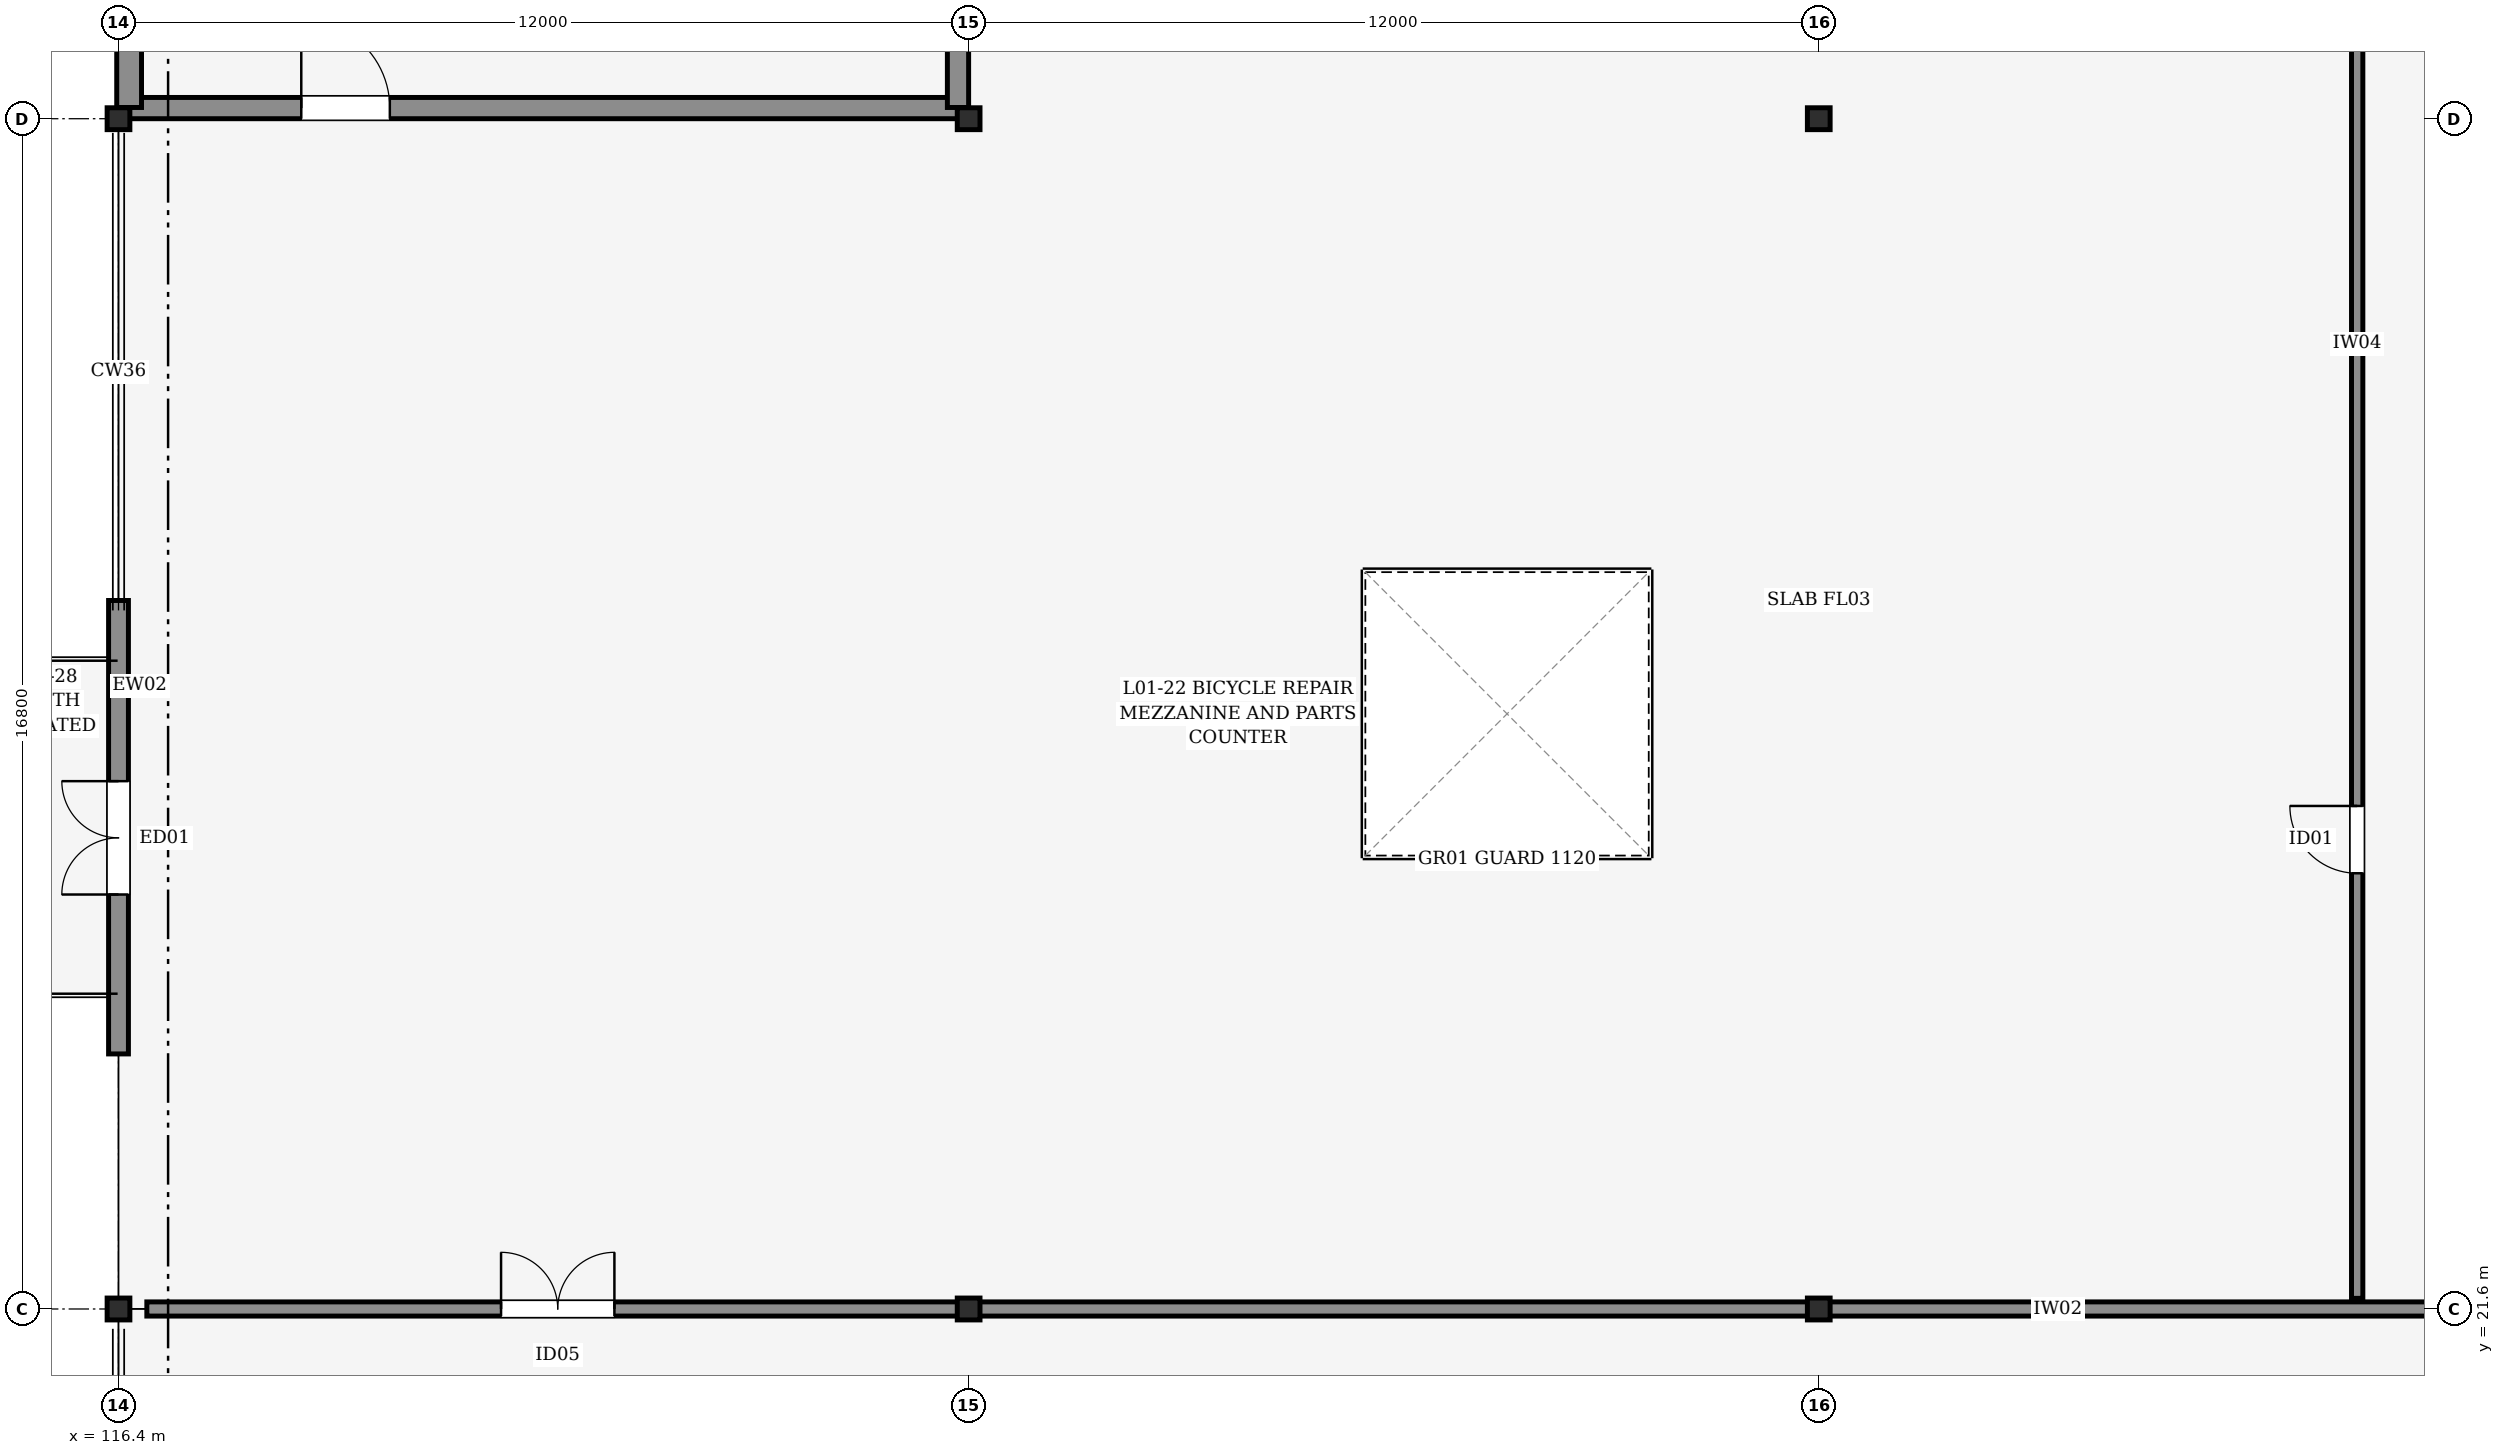
"""IFC4 building model, lengths in metres.
Left out: names, types, materials, properties, quantities, classifications, styles, units other than length and angle.
Written with IfcOpenShell. Run it as: python <this file> out.ifc"""

import sys

from ifc_helpers import new_model, si_unit, direction, frame, frame_2d, origin, origin_2d, place, context, subcontext, project, spatial, rectangle, i_section, extrude, element, fill, save


model = new_model("IFC4")
c1 = context("Model", 3, precision=1e-05, world=origin(), true_north=direction((0.0, 1.0)))
c2 = subcontext(c1, "Body", "Model", "MODEL_VIEW")
j1 = project(units=[si_unit("LENGTHUNIT", "METRE"), si_unit("PLANEANGLEUNIT", "RADIAN")], contexts=[c1])
p1 = place(None, origin())
s1 = spatial("IfcSite", under=j1, at=p1, CompositionType="ELEMENT")
p2 = place(p1, origin())
s2 = spatial("IfcBuilding", under=s1, at=p2, CompositionType="ELEMENT")
p3 = place(p2, frame((0.0, 0.0, 5.4)))
s3 = spatial("IfcBuildingStorey", under=s2, at=p3, CompositionType="ELEMENT", Elevation=5.4)
for number, where, z_axis, x_axis in (
    (1, (116.4, 21.6, 0.0), (0.0, 0.0, 1.0), (1.0, 0.0, 0.0)),
    (2, (116.4, 38.4, 0.0), (0.0, 0.0, 1.0), (1.0, 0.0, 0.0)),
    (3, (128.4, 21.6, 0.0), (0.0, 0.0, 1.0), (1.0, 0.0, 0.0)),
    (4, (128.4, 38.4, 0.0), (0.0, 0.0, 1.0), (1.0, 0.0, 0.0)),
    (5, (140.4, 21.6, 0.0), (0.0, 0.0, 1.0), (1.0, 0.0, 0.0)),
    (6, (140.4, 38.4, 0.0), (0.0, 0.0, 1.0), (1.0, 0.0, 0.0)),
):
    element("IfcColumn", number, at=place(p3, frame(where, z_axis=z_axis, x_axis=x_axis)), inside=s3, PredefinedType="COLUMN", context=c2, shape_type="SweptSolid", body=[
        extrude(i_section(OverallWidth=0.309, OverallDepth=0.321, WebThickness=0.014, FlangeThickness=0.022, FilletRadius=0.015, at=origin_2d()), origin(), (0.0, 0.0, 1.0), 3.6),
    ])
p4 = place(p3, frame((116.4, 25.2, 0.0), z_axis=(0.0, 0.0, 1.0), x_axis=(0.0, 1.0, 0.0)))
e7 = element("IfcWall", 7, at=p4, inside=s3, PredefinedType="STANDARD", context=c2, shape_type="SweptSolid", body=[
    extrude(rectangle(XDim=6.4, YDim=0.28, at=frame_2d((3.2, 0.0))), origin(), (0.0, 0.0, 1.0), 2.535),
])
p5 = place(p4, frame((2.25, 0.0, 0.0)))
e8 = element("IfcOpeningElement", 8, at=p5, cuts=e7, PredefinedType="OPENING", context=c2, shape_type="SweptSolid", body=[
    extrude(rectangle(XDim=1.6, YDim=2.2, at=frame_2d((0.8, 1.1))), frame((0.0, 0.15, 0.0), z_axis=(0.0, -1.0, 0.0), x_axis=(1.0, 0.0, 0.0)), (0.0, 0.0, 1.0), 0.3),
])
p6 = place(p3, frame((116.552, 38.55, 0.0), z_axis=(0.0, 0.0, 1.0), x_axis=(1.0, 0.0, 0.0)))
e9 = element("IfcWall", 9, at=p6, inside=s3, PredefinedType="SHEAR", context=c2, shape_type="SweptSolid", body=[
    extrude(rectangle(XDim=11.695, YDim=0.3, at=frame_2d((5.848, 0.0))), origin(), (0.0, 0.0, 1.0), 3.38),
])
p7 = place(p6, frame((2.427, 0.0, 0.0)))
e10 = element("IfcOpeningElement", 10, at=p7, cuts=e9, PredefinedType="OPENING", context=c2, shape_type="SweptSolid", body=[
    extrude(rectangle(XDim=1.25, YDim=2.15, at=frame_2d((0.625, 1.075))), frame((0.0, 0.16, 0.0), z_axis=(0.0, -1.0, 0.0), x_axis=(1.0, 0.0, 0.0)), (0.0, 0.0, 1.0), 0.32),
])
p8 = place(p3, frame((116.55, 38.559, 0.0), z_axis=(0.0, 0.0, 1.0), x_axis=(0.0, 1.0, 0.0)))
e11 = element("IfcWall", 11, at=p8, inside=s3, PredefinedType="SHEAR", context=c2, shape_type="SweptSolid", body=[
    extrude(rectangle(XDim=8.083, YDim=0.35, at=frame_2d((4.042, 0.0))), origin(), (0.0, 0.0, 1.0), 3.38),
])
p9 = place(p3, frame((128.25, 38.559, 0.0), z_axis=(0.0, 0.0, 1.0), x_axis=(0.0, 1.0, 0.0)))
e12 = element("IfcWall", 12, at=p9, inside=s3, PredefinedType="SHEAR", context=c2, shape_type="SweptSolid", body=[
    extrude(rectangle(XDim=8.083, YDim=0.3, at=frame_2d((4.042, 0.0))), origin(), (0.0, 0.0, 1.0), 3.38),
])
p10 = place(p3, frame((116.8, 21.6, 0.0), z_axis=(0.0, 0.0, 1.0), x_axis=(1.0, 0.0, 0.0)))
e13 = element("IfcWall", 13, at=p10, inside=s3, PredefinedType="PARTITIONING", context=c2, shape_type="SweptSolid", body=[
    extrude(rectangle(XDim=47.2, YDim=0.2, at=frame_2d((23.6, 0.0))), origin(), (0.0, 0.0, 1.0), 2.525),
])
p11 = place(p10, frame((5.0, 0.0, 0.0)))
e14 = element("IfcOpeningElement", 14, at=p11, cuts=e13, PredefinedType="OPENING", context=c2, shape_type="SweptSolid", body=[
    extrude(rectangle(XDim=1.6, YDim=2.25, at=frame_2d((0.8, 1.125))), frame((0.0, 0.11, 0.0), z_axis=(0.0, -1.0, 0.0), x_axis=(1.0, 0.0, 0.0)), (0.0, 0.0, 1.0), 0.22),
])
p12 = place(p3, frame((148.0, 21.75, 0.0), z_axis=(0.0, 0.0, 1.0), x_axis=(0.0, 1.0, 0.0)))
e15 = element("IfcWall", 15, at=p12, inside=s3, PredefinedType="PARTITIONING", context=c2, shape_type="SweptSolid", body=[
    extrude(rectangle(XDim=24.9, YDim=0.16, at=frame_2d((12.45, 0.0))), origin(), (0.0, 0.0, 1.0), 2.525),
])
p13 = place(p12, frame((6.0, 0.0, 0.0)))
e16 = element("IfcOpeningElement", 16, at=p13, cuts=e15, PredefinedType="OPENING", context=c2, shape_type="SweptSolid", body=[
    extrude(rectangle(XDim=0.95, YDim=2.1, at=frame_2d((0.475, 1.05))), frame((0.0, 0.09, 0.0), z_axis=(0.0, -1.0, 0.0), x_axis=(1.0, 0.0, 0.0)), (0.0, 0.0, 1.0), 0.18),
])
p14 = place(p5, origin())
e17 = element("IfcDoor", 17, at=p14, inside=s3, OperationType="DOUBLE_DOOR_SINGLE_SWING", PredefinedType="DOOR", context=c2, shape_type="SweptSolid", body=[
    extrude(rectangle(XDim=1.6, YDim=2.2, at=frame_2d((0.8, 1.1))), frame((0.0, 0.025, 0.0), z_axis=(0.0, -1.0, 0.0), x_axis=(1.0, 0.0, 0.0)), (0.0, 0.0, 1.0), 0.05),
])
fill(e8, e17)
p15 = place(p7, origin())
e18 = element("IfcDoor", 18, at=p15, inside=s3, OperationType="SINGLE_SWING_LEFT", PredefinedType="DOOR", context=c2, shape_type="SweptSolid", body=[
    extrude(rectangle(XDim=1.25, YDim=2.15, at=frame_2d((0.625, 1.075))), frame((0.0, 0.025, 0.0), z_axis=(0.0, -1.0, 0.0), x_axis=(1.0, 0.0, 0.0)), (0.0, 0.0, 1.0), 0.05),
])
fill(e10, e18)
p16 = place(p11, origin())
e19 = element("IfcDoor", 19, at=p16, inside=s3, OperationType="DOUBLE_DOOR_SINGLE_SWING", PredefinedType="DOOR", context=c2, shape_type="SweptSolid", body=[
    extrude(rectangle(XDim=1.6, YDim=2.25, at=frame_2d((0.8, 1.125))), frame((0.0, 0.025, 0.0), z_axis=(0.0, -1.0, 0.0), x_axis=(1.0, 0.0, 0.0)), (0.0, 0.0, 1.0), 0.05),
])
fill(e14, e19)
p17 = place(p13, origin())
e20 = element("IfcDoor", 20, at=p17, inside=s3, OperationType="SINGLE_SWING_RIGHT", PredefinedType="DOOR", context=c2, shape_type="SweptSolid", body=[
    extrude(rectangle(XDim=0.95, YDim=2.1, at=frame_2d((0.475, 1.05))), frame((0.0, 0.025, 0.0), z_axis=(0.0, -1.0, 0.0), x_axis=(1.0, 0.0, 0.0)), (0.0, 0.0, 1.0), 0.05),
])
fill(e16, e20)
save(model, sys.argv[1])
